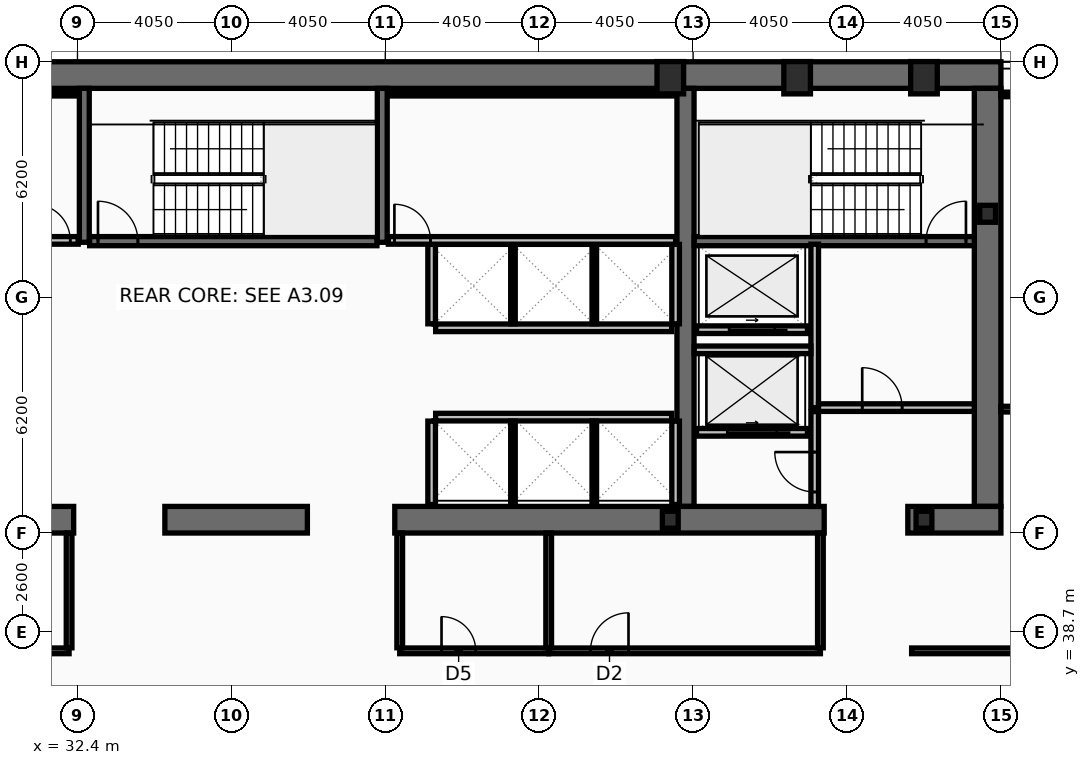
"""IFC4 building model, lengths in metres.
Left out: names, types, materials, properties, quantities, classifications, styles, units other than length and angle.
Written with IfcOpenShell. Run it as: python <this file> out.ifc"""

import sys

from ifc_helpers import new_model, si_unit, direction, frame, frame_2d, origin, origin_2d, place, context, subcontext, project, spatial, rectangle, hollow_rectangle, i_section, extrude, element, fill, save


model = new_model("IFC4")
c1 = context("Model", 3, precision=1e-05, world=origin(), true_north=direction((0.0, 1.0)))
c2 = subcontext(c1, "Body", "Model", "MODEL_VIEW")
j1 = project(units=[si_unit("LENGTHUNIT", "METRE"), si_unit("PLANEANGLEUNIT", "RADIAN")], contexts=[c1])
p1 = place(None, origin())
s1 = spatial("IfcSite", under=j1, at=p1, CompositionType="ELEMENT")
p2 = place(p1, origin())
s2 = spatial("IfcBuilding", under=s1, at=p2, CompositionType="ELEMENT")
p3 = place(p2, frame((0.0, 0.0, 111.0)))
s3 = spatial("IfcBuildingStorey", under=s2, at=p3, CompositionType="ELEMENT", Elevation=111.0)
p4 = place(p3, frame((16.2, 53.35, 0.0), z_axis=(0.0, 0.0, 1.0), x_axis=(1.0, 0.0, 0.0)))
e1 = element("IfcWall", 1, at=p4, inside=s3, PredefinedType="SHEAR", context=c2, shape_type="SweptSolid", body=[
    extrude(rectangle(XDim=40.5, YDim=0.7, at=frame_2d((20.25, 0.0))), origin(), (0.0, 0.0, 1.0), 3.44),
])
p5 = place(p3, frame((56.35, 53.0, 0.0), z_axis=(0.0, 0.0, 1.0), x_axis=(0.0, -1.0, 0.0)))
e2 = element("IfcWall", 2, at=p5, inside=s3, PredefinedType="SHEAR", context=c2, shape_type="SweptSolid", body=[
    extrude(rectangle(XDim=11.0, YDim=0.7, at=frame_2d((5.5, 0.0))), origin(), (0.0, 0.0, 1.0), 3.44),
])
p6 = place(p3, frame((48.4, 42.0, 0.0), z_axis=(0.0, 0.0, 1.0), x_axis=(0.0, 1.0, 0.0)))
e3 = element("IfcWall", 3, at=p6, inside=s3, PredefinedType="SHEAR", context=c2, shape_type="SweptSolid", body=[
    extrude(rectangle(XDim=11.0, YDim=0.45, at=frame_2d((5.5, 0.0))), origin(), (0.0, 0.0, 1.0), 3.44),
])
p7 = place(p3, frame((32.3, 41.65, 0.0), z_axis=(0.0, 0.0, 1.0), x_axis=(-1.0, 0.0, 0.0)))
e4 = element("IfcWall", 4, at=p7, inside=s3, PredefinedType="SHEAR", context=c2, shape_type="SweptSolid", body=[
    extrude(rectangle(XDim=11.45, YDim=0.7, at=frame_2d((5.725, 0.0))), origin(), (0.0, 0.0, 1.0), 3.44),
])
p8 = place(p3, frame((38.45, 41.65, 0.0), z_axis=(0.0, 0.0, 1.0), x_axis=(-1.0, 0.0, 0.0)))
e5 = element("IfcWall", 5, at=p8, inside=s3, PredefinedType="SHEAR", context=c2, shape_type="SweptSolid", body=[
    extrude(rectangle(XDim=3.75, YDim=0.7, at=frame_2d((1.875, 0.0))), origin(), (0.0, 0.0, 1.0), 3.44),
])
p9 = place(p3, frame((52.05, 41.65, 0.0), z_axis=(0.0, 0.0, 1.0), x_axis=(-1.0, 0.0, 0.0)))
e6 = element("IfcWall", 6, at=p9, inside=s3, PredefinedType="SHEAR", context=c2, shape_type="SweptSolid", body=[
    extrude(rectangle(XDim=11.3, YDim=0.7, at=frame_2d((5.65, 0.0))), origin(), (0.0, 0.0, 1.0), 3.44),
])
p10 = place(p3, frame((56.7, 41.65, 0.0), z_axis=(0.0, 0.0, 1.0), x_axis=(-1.0, 0.0, 0.0)))
e7 = element("IfcWall", 7, at=p10, inside=s3, PredefinedType="SHEAR", context=c2, shape_type="SweptSolid", body=[
    extrude(rectangle(XDim=2.45, YDim=0.7, at=frame_2d((1.225, 0.0))), origin(), (0.0, 0.0, 1.0), 3.44),
])
for number, where, z_axis, x_axis in (
    (8, (32.58, 48.95, 0.0), (0.0, 0.0, 1.0), (0.0, 1.0, 0.0)),
    (9, (40.42, 48.95, 0.0), (0.0, 0.0, 1.0), (0.0, 1.0, 0.0)),
):
    element("IfcWall", number, at=place(p3, frame(where, z_axis=z_axis, x_axis=x_axis)), inside=s3, PredefinedType="SHEAR", context=c2, shape_type="SweptSolid", body=[
        extrude(rectangle(XDim=4.05, YDim=0.26, at=frame_2d((2.025, 0.0))), origin(), (0.0, 0.0, 1.0), 3.44),
    ])
p11 = place(p3, frame((48.63, 48.98, 0.0), z_axis=(0.0, 0.0, 1.0), x_axis=(1.0, 0.0, 0.0)))
e10 = element("IfcWall", 10, at=p11, inside=s3, PredefinedType="SHEAR", context=c2, shape_type="SweptSolid", body=[
    extrude(rectangle(XDim=7.37, YDim=0.24, at=frame_2d((3.685, 0.0))), origin(), (0.0, 0.0, 1.0), 3.44),
])
p12 = place(p11, frame((6.1, 0.0, 0.0)))
e11 = element("IfcOpeningElement", 11, at=p12, cuts=e10, PredefinedType="OPENING", context=c2, shape_type="SweptSolid", body=[
    extrude(rectangle(XDim=1.05, YDim=2.15, at=frame_2d((0.525, 1.075))), frame((0.0, 0.13, 0.0), z_axis=(0.0, -1.0, 0.0), x_axis=(1.0, 0.0, 0.0)), (0.0, 0.0, 1.0), 0.26),
])
p13 = place(p3, frame((32.72, 48.98, 0.0), z_axis=(0.0, 0.0, 1.0), x_axis=(1.0, 0.0, 0.0)))
e12 = element("IfcWall", 12, at=p13, inside=s3, PredefinedType="SHEAR", context=c2, shape_type="SweptSolid", body=[
    extrude(rectangle(XDim=7.56, YDim=0.24, at=frame_2d((3.78, 0.0))), origin(), (0.0, 0.0, 1.0), 3.44),
])
p14 = place(p13, frame((0.22, 0.0, 0.0)))
e13 = element("IfcOpeningElement", 13, at=p14, cuts=e12, PredefinedType="OPENING", context=c2, shape_type="SweptSolid", body=[
    extrude(rectangle(XDim=1.05, YDim=2.15, at=frame_2d((0.525, 1.075))), frame((0.0, 0.13, 0.0), z_axis=(0.0, -1.0, 0.0), x_axis=(1.0, 0.0, 0.0)), (0.0, 0.0, 1.0), 0.26),
])
for number, where, z_axis, x_axis in (
    (14, (48.0, 53.28, 0.0), (0.0, 0.0, 1.0), (1.0, 0.0, 0.0)),
    (15, (51.337, 53.28, 0.0), (0.0, 0.0, 1.0), (1.0, 0.0, 0.0)),
    (16, (54.675, 53.28, 0.0), (0.0, 0.0, 1.0), (1.0, 0.0, 0.0)),
):
    element("IfcColumn", number, at=place(p3, frame(where, z_axis=z_axis, x_axis=x_axis)), inside=s3, PredefinedType="COLUMN", context=c2, shape_type="SweptSolid", body=[
        extrude(hollow_rectangle(XDim=0.7, YDim=0.85, WallThickness=0.05, at=origin_2d()), origin(), (0.0, 0.0, 1.0), 3.6),
    ])
for number, where, z_axis, x_axis in (
    (17, (56.35, 49.7, 0.0), (0.0, 0.0, 1.0), (1.0, 0.0, 0.0)),
    (18, (48.0, 41.65, 0.0), (0.0, 0.0, 1.0), (1.0, 0.0, 0.0)),
    (19, (54.675, 41.65, 0.0), (0.0, 0.0, 1.0), (1.0, 0.0, 0.0)),
):
    element("IfcColumn", number, at=place(p3, frame(where, z_axis=z_axis, x_axis=x_axis)), inside=s3, PredefinedType="COLUMN", context=c2, shape_type="SweptSolid", body=[
        extrude(i_section(OverallWidth=0.416, OverallDepth=0.446, WebThickness=0.039, FlangeThickness=0.063, at=origin_2d()), origin(), (0.0, 0.0, 1.0), 3.6),
    ])
p15 = place(p3, frame((51.61, 43.95, 0.0), z_axis=(0.0, 0.0, 1.0), x_axis=(-1.0, 0.0, 0.0)))
e20 = element("IfcWall", 20, at=p15, inside=s3, PredefinedType="PARTITIONING", context=c2, shape_type="SweptSolid", body=[
    extrude(rectangle(XDim=2.92, YDim=0.2, at=frame_2d((1.46, 0.0))), origin(), (0.0, 0.0, 1.0), 3.44),
])
p16 = place(p15, frame((0.81, 0.0, 0.0)))
e21 = element("IfcOpeningElement", 21, at=p16, cuts=e20, PredefinedType="OPENING", context=c2, shape_type="SweptSolid", body=[
    extrude(rectangle(XDim=1.3, YDim=2.18, at=frame_2d((0.65, 1.09))), frame((0.0, 0.11, 0.0), z_axis=(0.0, -1.0, 0.0), x_axis=(1.0, 0.0, 0.0)), (0.0, 0.0, 1.0), 0.22),
])
p17 = place(p3, frame((51.61, 46.65, 0.0), z_axis=(0.0, 0.0, 1.0), x_axis=(-1.0, 0.0, 0.0)))
e22 = element("IfcWall", 22, at=p17, inside=s3, PredefinedType="PARTITIONING", context=c2, shape_type="SweptSolid", body=[
    extrude(rectangle(XDim=2.92, YDim=0.2, at=frame_2d((1.46, 0.0))), origin(), (0.0, 0.0, 1.0), 3.44),
])
p18 = place(p17, frame((0.86, 0.0, 0.0)))
e23 = element("IfcOpeningElement", 23, at=p18, cuts=e22, PredefinedType="OPENING", context=c2, shape_type="SweptSolid", body=[
    extrude(rectangle(XDim=1.2, YDim=2.18, at=frame_2d((0.6, 1.09))), frame((0.0, 0.11, 0.0), z_axis=(0.0, -1.0, 0.0), x_axis=(1.0, 0.0, 0.0)), (0.0, 0.0, 1.0), 0.22),
])
p19 = place(p3, frame((51.8, 44.6, 0.0), z_axis=(0.0, 0.0, 1.0), x_axis=(0.0, 1.0, 0.0)))
e24 = element("IfcWall", 24, at=p19, inside=s3, PredefinedType="PARTITIONING", context=c2, shape_type="SweptSolid", body=[
    extrude(rectangle(XDim=4.3, YDim=0.2, at=frame_2d((2.15, 0.0))), origin(), (0.0, 0.0, 1.0), 3.44),
])
p20 = place(p3, frame((51.9, 44.6, 0.0), z_axis=(0.0, 0.0, 1.0), x_axis=(1.0, 0.0, 0.0)))
e25 = element("IfcWall", 25, at=p20, inside=s3, PredefinedType="PARTITIONING", context=c2, shape_type="SweptSolid", body=[
    extrude(rectangle(XDim=4.1, YDim=0.2, at=frame_2d((2.05, 0.0))), origin(), (0.0, 0.0, 1.0), 3.44),
])
p21 = place(p20, frame((1.15, 0.0, 0.0)))
e26 = element("IfcOpeningElement", 26, at=p21, cuts=e25, PredefinedType="OPENING", context=c2, shape_type="SweptSolid", body=[
    extrude(rectangle(XDim=1.05, YDim=2.15, at=frame_2d((0.525, 1.075))), frame((0.0, 0.11, 0.0), z_axis=(0.0, -1.0, 0.0), x_axis=(1.0, 0.0, 0.0)), (0.0, 0.0, 1.0), 0.22),
])
p22 = place(p3, frame((48.63, 46.12, 0.0), z_axis=(0.0, 0.0, 1.0), x_axis=(1.0, 0.0, 0.0)))
e27 = element("IfcWall", 27, at=p22, inside=s3, PredefinedType="PARTITIONING", context=c2, shape_type="SweptSolid", body=[
    extrude(rectangle(XDim=3.07, YDim=0.2, at=frame_2d((1.535, 0.0))), origin(), (0.0, 0.0, 1.0), 3.44),
])
p23 = place(p3, frame((51.8, 42.0, 0.0), z_axis=(0.0, 0.0, 1.0), x_axis=(0.0, 1.0, 0.0)))
e28 = element("IfcWall", 28, at=p23, inside=s3, PredefinedType="PARTITIONING", context=c2, shape_type="SweptSolid", body=[
    extrude(rectangle(XDim=2.495, YDim=0.2, at=frame_2d((1.248, 0.0))), origin(), (0.0, 0.0, 1.0), 3.44),
])
p24 = place(p23, frame((0.38, 0.0, 0.0)))
e29 = element("IfcOpeningElement", 29, at=p24, cuts=e28, PredefinedType="OPENING", context=c2, shape_type="SweptSolid", body=[
    extrude(rectangle(XDim=1.05, YDim=2.15, at=frame_2d((0.525, 1.075))), frame((0.0, 0.11, 0.0), z_axis=(0.0, -1.0, 0.0), x_axis=(1.0, 0.0, 0.0)), (0.0, 0.0, 1.0), 0.22),
])
p25 = place(p3, frame((41.825, 46.7, 0.0), z_axis=(0.0, 0.0, 1.0), x_axis=(1.0, 0.0, 0.0)))
e30 = element("IfcWall", 30, at=p25, inside=s3, PredefinedType="PARTITIONING", context=c2, shape_type="SweptSolid", body=[
    extrude(rectangle(XDim=6.21, YDim=0.2, at=frame_2d((3.105, 0.0))), origin(), (0.0, 0.0, 1.0), 3.44),
])
for number, where, z_axis, x_axis in (
    (31, (41.72, 46.805, 0.0), (0.0, 0.0, 1.0), (0.0, 1.0, 0.0)),
    (32, (48.14, 46.805, 0.0), (0.0, 0.0, 1.0), (0.0, 1.0, 0.0)),
):
    element("IfcWall", number, at=place(p3, frame(where, z_axis=z_axis, x_axis=x_axis)), inside=s3, PredefinedType="PARTITIONING", context=c2, shape_type="SweptSolid", body=[
        extrude(rectangle(XDim=2.09, YDim=0.2, at=frame_2d((1.045, 0.0))), origin(), (0.0, 0.0, 1.0), 3.44),
    ])
for number, where, z_axis, x_axis in (
    (33, (43.86, 46.805, 0.0), (0.0, 0.0, 1.0), (0.0, 1.0, 0.0)),
    (34, (46.0, 46.805, 0.0), (0.0, 0.0, 1.0), (0.0, 1.0, 0.0)),
):
    element("IfcWall", number, at=place(p3, frame(where, z_axis=z_axis, x_axis=x_axis)), inside=s3, PredefinedType="PARTITIONING", context=c2, shape_type="SweptSolid", body=[
        extrude(rectangle(XDim=2.09, YDim=0.12, at=frame_2d((1.045, 0.0))), origin(), (0.0, 0.0, 1.0), 3.44),
    ])
p26 = place(p3, frame((41.825, 44.35, 0.0), z_axis=(0.0, 0.0, 1.0), x_axis=(1.0, 0.0, 0.0)))
e35 = element("IfcWall", 35, at=p26, inside=s3, PredefinedType="PARTITIONING", context=c2, shape_type="SweptSolid", body=[
    extrude(rectangle(XDim=6.21, YDim=0.2, at=frame_2d((3.105, 0.0))), origin(), (0.0, 0.0, 1.0), 3.44),
])
for number, where, z_axis, x_axis in (
    (36, (41.72, 42.05, 0.0), (0.0, 0.0, 1.0), (0.0, 1.0, 0.0)),
    (37, (48.14, 42.05, 0.0), (0.0, 0.0, 1.0), (0.0, 1.0, 0.0)),
):
    element("IfcWall", number, at=place(p3, frame(where, z_axis=z_axis, x_axis=x_axis)), inside=s3, PredefinedType="PARTITIONING", context=c2, shape_type="SweptSolid", body=[
        extrude(rectangle(XDim=2.195, YDim=0.2, at=frame_2d((1.098, 0.0))), origin(), (0.0, 0.0, 1.0), 3.44),
    ])
for number, where, z_axis, x_axis in (
    (38, (43.86, 42.05, 0.0), (0.0, 0.0, 1.0), (0.0, 1.0, 0.0)),
    (39, (46.0, 42.05, 0.0), (0.0, 0.0, 1.0), (0.0, 1.0, 0.0)),
):
    element("IfcWall", number, at=place(p3, frame(where, z_axis=z_axis, x_axis=x_axis)), inside=s3, PredefinedType="PARTITIONING", context=c2, shape_type="SweptSolid", body=[
        extrude(rectangle(XDim=2.195, YDim=0.12, at=frame_2d((1.098, 0.0))), origin(), (0.0, 0.0, 1.0), 3.44),
    ])
p27 = place(p3, frame((24.7, 52.86, 0.0), z_axis=(0.0, 0.0, 1.0), x_axis=(1.0, 0.0, 0.0)))
e40 = element("IfcWall", 40, at=p27, inside=s3, PredefinedType="PARTITIONING", context=c2, shape_type="SweptSolid", body=[
    extrude(rectangle(XDim=7.72, YDim=0.12, at=frame_2d((3.86, 0.0))), origin(), (0.0, 0.0, 1.0), 3.44),
])
p28 = place(p3, frame((24.7, 49.0, 0.0), z_axis=(0.0, 0.0, 1.0), x_axis=(1.0, 0.0, 0.0)))
e41 = element("IfcWall", 41, at=p28, inside=s3, PredefinedType="PARTITIONING", context=c2, shape_type="SweptSolid", body=[
    extrude(rectangle(XDim=7.72, YDim=0.2, at=frame_2d((3.86, 0.0))), origin(), (0.0, 0.0, 1.0), 3.44),
])
p29 = place(p28, frame((6.56, 0.0, 0.0)))
e42 = element("IfcOpeningElement", 42, at=p29, cuts=e41, PredefinedType="OPENING", context=c2, shape_type="SweptSolid", body=[
    extrude(rectangle(XDim=0.95, YDim=2.1, at=frame_2d((0.475, 1.05))), frame((0.0, 0.11, 0.0), z_axis=(0.0, -1.0, 0.0), x_axis=(1.0, 0.0, 0.0)), (0.0, 0.0, 1.0), 0.22),
])
p30 = place(p3, frame((40.58, 52.86, 0.0), z_axis=(0.0, 0.0, 1.0), x_axis=(1.0, 0.0, 0.0)))
e43 = element("IfcWall", 43, at=p30, inside=s3, PredefinedType="PARTITIONING", context=c2, shape_type="SweptSolid", body=[
    extrude(rectangle(XDim=7.56, YDim=0.12, at=frame_2d((3.78, 0.0))), origin(), (0.0, 0.0, 1.0), 3.44),
])
p31 = place(p3, frame((40.58, 49.0, 0.0), z_axis=(0.0, 0.0, 1.0), x_axis=(1.0, 0.0, 0.0)))
e44 = element("IfcWall", 44, at=p31, inside=s3, PredefinedType="PARTITIONING", context=c2, shape_type="SweptSolid", body=[
    extrude(rectangle(XDim=7.56, YDim=0.2, at=frame_2d((3.78, 0.0))), origin(), (0.0, 0.0, 1.0), 3.44),
])
p32 = place(p31, frame((0.16, 0.0, 0.0)))
e45 = element("IfcOpeningElement", 45, at=p32, cuts=e44, PredefinedType="OPENING", context=c2, shape_type="SweptSolid", body=[
    extrude(rectangle(XDim=0.95, YDim=2.1, at=frame_2d((0.475, 1.05))), frame((0.0, 0.11, 0.0), z_axis=(0.0, -1.0, 0.0), x_axis=(1.0, 0.0, 0.0)), (0.0, 0.0, 1.0), 0.22),
])
p33 = place(p3, frame((29.2, 38.2, 0.0), z_axis=(0.0, 0.0, 1.0), x_axis=(1.0, 0.0, 0.0)))
e46 = element("IfcWall", 46, at=p33, inside=s3, PredefinedType="PARTITIONING", context=c2, shape_type="SweptSolid", body=[
    extrude(rectangle(XDim=2.98, YDim=0.15, at=frame_2d((1.49, 0.0))), origin(), (0.0, 0.0, 1.0), 2.73),
])
p34 = place(p33, frame((0.7, 0.0, 0.0)))
e47 = element("IfcOpeningElement", 47, at=p34, cuts=e46, PredefinedType="OPENING", context=c2, shape_type="SweptSolid", body=[
    extrude(rectangle(XDim=0.95, YDim=2.05, at=frame_2d((0.475, 1.025))), frame((0.0, 0.085, 0.0), z_axis=(0.0, -1.0, 0.0), x_axis=(1.0, 0.0, 0.0)), (0.0, 0.0, 1.0), 0.17),
])
p35 = place(p3, frame((32.18, 38.28, 0.0), z_axis=(0.0, 0.0, 1.0), x_axis=(0.0, 1.0, 0.0)))
e48 = element("IfcWall", 48, at=p35, inside=s3, PredefinedType="PARTITIONING", context=c2, shape_type="SweptSolid", body=[
    extrude(rectangle(XDim=3.02, YDim=0.15, at=frame_2d((1.51, 0.0))), origin(), (0.0, 0.0, 1.0), 3.44),
])
p36 = place(p3, frame((40.88, 38.2, 0.0), z_axis=(0.0, 0.0, 1.0), x_axis=(1.0, 0.0, 0.0)))
e49 = element("IfcWall", 49, at=p36, inside=s3, PredefinedType="PARTITIONING", context=c2, shape_type="SweptSolid", body=[
    extrude(rectangle(XDim=3.92, YDim=0.15, at=frame_2d((1.96, 0.0))), origin(), (0.0, 0.0, 1.0), 2.73),
])
p37 = place(p36, frame((1.1, 0.0, 0.0)))
e50 = element("IfcOpeningElement", 50, at=p37, cuts=e49, PredefinedType="OPENING", context=c2, shape_type="SweptSolid", body=[
    extrude(rectangle(XDim=0.9, YDim=2.05, at=frame_2d((0.45, 1.025))), frame((0.0, 0.085, 0.0), z_axis=(0.0, -1.0, 0.0), x_axis=(1.0, 0.0, 0.0)), (0.0, 0.0, 1.0), 0.17),
])
p38 = place(p3, frame((44.8, 38.2, 0.0), z_axis=(0.0, 0.0, 1.0), x_axis=(1.0, 0.0, 0.0)))
e51 = element("IfcWall", 51, at=p38, inside=s3, PredefinedType="PARTITIONING", context=c2, shape_type="SweptSolid", body=[
    extrude(rectangle(XDim=7.15, YDim=0.15, at=frame_2d((3.575, 0.0))), origin(), (0.0, 0.0, 1.0), 2.73),
])
p39 = place(p38, frame((1.1, 0.0, 0.0)))
e52 = element("IfcOpeningElement", 52, at=p39, cuts=e51, PredefinedType="OPENING", context=c2, shape_type="SweptSolid", body=[
    extrude(rectangle(XDim=1.0, YDim=2.05, at=frame_2d((0.5, 1.025))), frame((0.0, 0.085, 0.0), z_axis=(0.0, -1.0, 0.0), x_axis=(1.0, 0.0, 0.0)), (0.0, 0.0, 1.0), 0.17),
])
for number, where, z_axis, x_axis in (
    (53, (40.88, 38.28, 0.0), (0.0, 0.0, 1.0), (0.0, 1.0, 0.0)),
    (54, (44.8, 38.28, 0.0), (0.0, 0.0, 1.0), (0.0, 1.0, 0.0)),
    (55, (51.95, 38.28, 0.0), (0.0, 0.0, 1.0), (0.0, 1.0, 0.0)),
):
    element("IfcWall", number, at=place(p3, frame(where, z_axis=z_axis, x_axis=x_axis)), inside=s3, PredefinedType="PARTITIONING", context=c2, shape_type="SweptSolid", body=[
        extrude(rectangle(XDim=3.02, YDim=0.15, at=frame_2d((1.51, 0.0))), origin(), (0.0, 0.0, 1.0), 3.44),
    ])
p40 = place(p3, frame((54.35, 38.2, 0.0), z_axis=(0.0, 0.0, 1.0), x_axis=(1.0, 0.0, 0.0)))
e56 = element("IfcWall", 56, at=p40, inside=s3, PredefinedType="PARTITIONING", context=c2, shape_type="SweptSolid", body=[
    extrude(rectangle(XDim=14.52, YDim=0.15, at=frame_2d((7.26, 0.0))), origin(), (0.0, 0.0, 1.0), 2.73),
])
p41 = place(p40, frame((3.25, 0.0, 0.0)))
e57 = element("IfcOpeningElement", 57, at=p41, cuts=e56, PredefinedType="OPENING", context=c2, shape_type="SweptSolid", body=[
    extrude(rectangle(XDim=0.95, YDim=2.05, at=frame_2d((0.475, 1.025))), frame((0.0, 0.085, 0.0), z_axis=(0.0, -1.0, 0.0), x_axis=(1.0, 0.0, 0.0)), (0.0, 0.0, 1.0), 0.17),
])
p42 = place(p3, frame((56.7, 44.56, 0.0), z_axis=(0.0, 0.0, 1.0), x_axis=(1.0, 0.0, 0.0)))
e58 = element("IfcWall", 58, at=p42, inside=s3, PredefinedType="PARTITIONING", context=c2, shape_type="SweptSolid", body=[
    extrude(rectangle(XDim=12.105, YDim=0.15, at=frame_2d((6.052, 0.0))), origin(), (0.0, 0.0, 1.0), 2.83),
])
p43 = place(p42, frame((0.9, 0.0, 0.0)))
e59 = element("IfcOpeningElement", 59, at=p43, cuts=e58, PredefinedType="OPENING", context=c2, shape_type="SweptSolid", body=[
    extrude(rectangle(XDim=0.9, YDim=2.05, at=frame_2d((0.45, 1.025))), frame((0.0, 0.085, 0.0), z_axis=(0.0, -1.0, 0.0), x_axis=(1.0, 0.0, 0.0)), (0.0, 0.0, 1.0), 0.17),
])
p44 = place(p3, frame((56.7, 52.84, 0.0), z_axis=(0.0, 0.0, 1.0), x_axis=(1.0, 0.0, 0.0)))
e60 = element("IfcWall", 60, at=p44, inside=s3, PredefinedType="PARTITIONING", context=c2, shape_type="SweptSolid", body=[
    extrude(rectangle(XDim=12.105, YDim=0.12, at=frame_2d((6.052, 0.0))), origin(), (0.0, 0.0, 1.0), 3.44),
])
p45 = place(p12, origin())
e61 = element("IfcDoor", 61, at=p45, inside=s3, OperationType="SINGLE_SWING_RIGHT", PredefinedType="DOOR", context=c2, shape_type="SweptSolid", body=[
    extrude(rectangle(XDim=1.05, YDim=2.15, at=frame_2d((0.525, 1.075))), frame((0.0, 0.025, 0.0), z_axis=(0.0, -1.0, 0.0), x_axis=(1.0, 0.0, 0.0)), (0.0, 0.0, 1.0), 0.05),
])
fill(e11, e61)
p46 = place(p14, origin())
e62 = element("IfcDoor", 62, at=p46, inside=s3, OperationType="SINGLE_SWING_LEFT", PredefinedType="DOOR", context=c2, shape_type="SweptSolid", body=[
    extrude(rectangle(XDim=1.05, YDim=2.15, at=frame_2d((0.525, 1.075))), frame((0.0, 0.025, 0.0), z_axis=(0.0, -1.0, 0.0), x_axis=(1.0, 0.0, 0.0)), (0.0, 0.0, 1.0), 0.05),
])
fill(e13, e62)
p47 = place(p16, origin())
e63 = element("IfcDoor", 63, at=p47, inside=s3, OperationType="SLIDING_TO_LEFT", PredefinedType="DOOR", context=c2, shape_type="SweptSolid", body=[
    extrude(rectangle(XDim=1.3, YDim=2.18, at=frame_2d((0.65, 1.09))), frame((0.0, 0.025, 0.0), z_axis=(0.0, -1.0, 0.0), x_axis=(1.0, 0.0, 0.0)), (0.0, 0.0, 1.0), 0.05),
])
fill(e21, e63)
p48 = place(p18, origin())
e64 = element("IfcDoor", 64, at=p48, inside=s3, OperationType="SLIDING_TO_LEFT", PredefinedType="DOOR", context=c2, shape_type="SweptSolid", body=[
    extrude(rectangle(XDim=1.2, YDim=2.18, at=frame_2d((0.6, 1.09))), frame((0.0, 0.025, 0.0), z_axis=(0.0, -1.0, 0.0), x_axis=(1.0, 0.0, 0.0)), (0.0, 0.0, 1.0), 0.05),
])
fill(e23, e64)
p49 = place(p21, origin())
e65 = element("IfcDoor", 65, at=p49, inside=s3, OperationType="SINGLE_SWING_LEFT", PredefinedType="DOOR", context=c2, shape_type="SweptSolid", body=[
    extrude(rectangle(XDim=1.05, YDim=2.15, at=frame_2d((0.525, 1.075))), frame((0.0, 0.025, 0.0), z_axis=(0.0, -1.0, 0.0), x_axis=(1.0, 0.0, 0.0)), (0.0, 0.0, 1.0), 0.05),
])
fill(e26, e65)
p50 = place(p24, origin())
e66 = element("IfcDoor", 66, at=p50, inside=s3, OperationType="SINGLE_SWING_RIGHT", PredefinedType="DOOR", context=c2, shape_type="SweptSolid", body=[
    extrude(rectangle(XDim=1.05, YDim=2.15, at=frame_2d((0.525, 1.075))), frame((0.0, 0.025, 0.0), z_axis=(0.0, -1.0, 0.0), x_axis=(1.0, 0.0, 0.0)), (0.0, 0.0, 1.0), 0.05),
])
fill(e29, e66)
p51 = place(p29, origin())
e67 = element("IfcDoor", 67, at=p51, inside=s3, OperationType="SINGLE_SWING_LEFT", PredefinedType="DOOR", context=c2, shape_type="SweptSolid", body=[
    extrude(rectangle(XDim=0.95, YDim=2.1, at=frame_2d((0.475, 1.05))), frame((0.0, 0.025, 0.0), z_axis=(0.0, -1.0, 0.0), x_axis=(1.0, 0.0, 0.0)), (0.0, 0.0, 1.0), 0.05),
])
fill(e42, e67)
p52 = place(p32, origin())
e68 = element("IfcDoor", 68, at=p52, inside=s3, OperationType="SINGLE_SWING_LEFT", PredefinedType="DOOR", context=c2, shape_type="SweptSolid", body=[
    extrude(rectangle(XDim=0.95, YDim=2.1, at=frame_2d((0.475, 1.05))), frame((0.0, 0.025, 0.0), z_axis=(0.0, -1.0, 0.0), x_axis=(1.0, 0.0, 0.0)), (0.0, 0.0, 1.0), 0.05),
])
fill(e45, e68)
p53 = place(p37, origin())
e69 = element("IfcDoor", 69, at=p53, inside=s3, OperationType="SINGLE_SWING_LEFT", PredefinedType="DOOR", context=c2, shape_type="SweptSolid", body=[
    extrude(rectangle(XDim=0.9, YDim=2.05, at=frame_2d((0.45, 1.025))), frame((0.0, 0.025, 0.0), z_axis=(0.0, -1.0, 0.0), x_axis=(1.0, 0.0, 0.0)), (0.0, 0.0, 1.0), 0.05),
])
fill(e50, e69)
p54 = place(p39, origin())
e70 = element("IfcDoor", 70, at=p54, inside=s3, OperationType="SINGLE_SWING_RIGHT", PredefinedType="DOOR", context=c2, shape_type="SweptSolid", body=[
    extrude(rectangle(XDim=1.0, YDim=2.05, at=frame_2d((0.5, 1.025))), frame((0.0, 0.025, 0.0), z_axis=(0.0, -1.0, 0.0), x_axis=(1.0, 0.0, 0.0)), (0.0, 0.0, 1.0), 0.05),
])
fill(e52, e70)
save(model, sys.argv[1])
